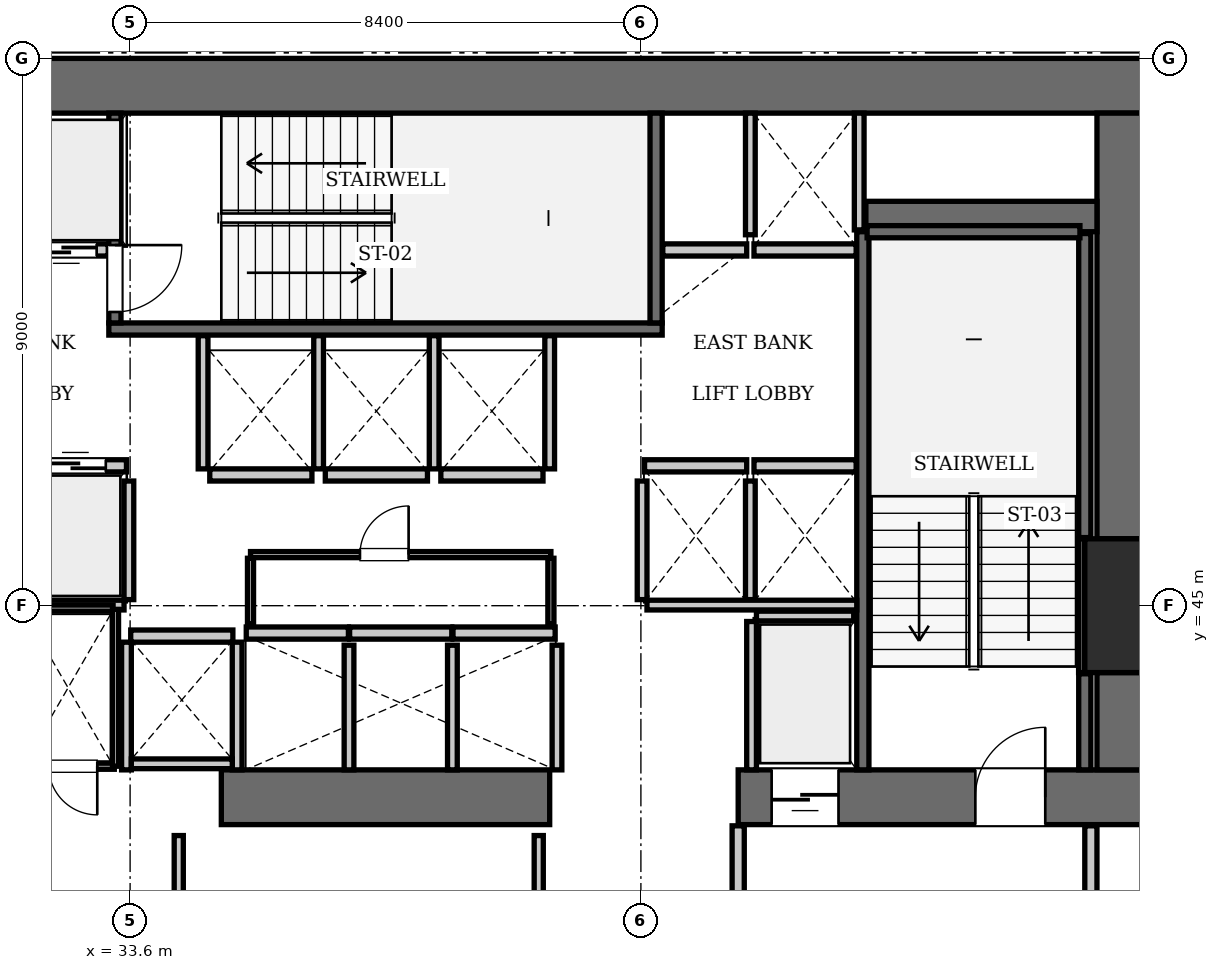
"""IFC4 building model, lengths in metres.
Left out: names, types, materials, properties, quantities, classifications, styles, units other than length and angle.
Written with IfcOpenShell. Run it as: python <this file> out.ifc"""

import sys

from ifc_helpers import new_model, si_unit, direction, frame, frame_2d, origin, origin_2d, place, context, subcontext, project, spatial, rectangle, extrude, element, fill, save


model = new_model("IFC4")
c1 = context("Model", 3, precision=1e-05, world=origin(), true_north=direction((0.0, 1.0)))
c2 = subcontext(c1, "Body", "Model", "MODEL_VIEW")
j1 = project(units=[si_unit("LENGTHUNIT", "METRE"), si_unit("PLANEANGLEUNIT", "RADIAN")], contexts=[c1])
p1 = place(None, origin())
s1 = spatial("IfcSite", under=j1, at=p1, CompositionType="ELEMENT")
p2 = place(p1, origin())
s2 = spatial("IfcBuilding", under=s1, at=p2, CompositionType="ELEMENT")
p3 = place(p2, frame((0.0, 0.0, 53.9)))
s3 = spatial("IfcBuildingStorey", under=s2, at=p3, CompositionType="ELEMENT", Elevation=53.9)
p4 = place(p3, frame((50.4, 45.0, 0.0), z_axis=(0.0, 0.0, 1.0), x_axis=(1.0, 0.0, 0.0)))
e1 = element("IfcColumn", 1, at=p4, inside=s3, PredefinedType="COLUMN", context=c2, shape_type="SweptSolid", body=[
    extrude(rectangle(XDim=2.2, YDim=2.2, at=origin_2d()), origin(), (0.0, 0.0, 1.0), 3.85),
])
p5 = place(p3, frame((25.2, 53.55, 0.0), z_axis=(0.0, 0.0, 1.0), x_axis=(1.0, 0.0, 0.0)))
e2 = element("IfcWall", 2, at=p5, inside=s3, PredefinedType="SHEAR", context=c2, shape_type="SweptSolid", body=[
    extrude(rectangle(XDim=25.2, YDim=0.9, at=frame_2d((12.6, 0.0))), origin(), (0.0, 0.0, 1.0), 3.85),
])
p6 = place(p3, frame((35.1, 41.85, 0.0), z_axis=(0.0, 0.0, 1.0), x_axis=(1.0, 0.0, 0.0)))
e3 = element("IfcWall", 3, at=p6, inside=s3, PredefinedType="SHEAR", context=c2, shape_type="SweptSolid", body=[
    extrude(rectangle(XDim=5.4, YDim=0.9, at=frame_2d((2.7, 0.0))), origin(), (0.0, 0.0, 1.0), 3.85),
])
p7 = place(p3, frame((43.6, 41.85, 0.0), z_axis=(0.0, 0.0, 1.0), x_axis=(1.0, 0.0, 0.0)))
e4 = element("IfcWall", 4, at=p7, inside=s3, PredefinedType="SHEAR", context=c2, shape_type="SweptSolid", body=[
    extrude(rectangle(XDim=6.8, YDim=0.9, at=frame_2d((3.4, 0.0))), origin(), (0.0, 0.0, 1.0), 3.85),
])
p8 = place(p7, frame((3.9, 0.0, 0.0)))
e5 = element("IfcOpeningElement", 5, at=p8, cuts=e4, PredefinedType="OPENING", context=c2, shape_type="SweptSolid", body=[
    extrude(rectangle(XDim=1.15, YDim=2.15, at=frame_2d((0.575, 1.075))), frame((0.0, 0.46, 0.0), z_axis=(0.0, -1.0, 0.0), x_axis=(1.0, 0.0, 0.0)), (0.0, 0.0, 1.0), 0.92),
])
p9 = place(p7, frame((0.55, 0.0, 0.0)))
e6 = element("IfcOpeningElement", 6, at=p9, cuts=e4, PredefinedType="OPENING", context=c2, shape_type="SweptSolid", body=[
    extrude(rectangle(XDim=1.1, YDim=2.2, at=frame_2d((0.55, 1.1))), frame((0.0, 0.46, 0.0), z_axis=(0.0, -1.0, 0.0), x_axis=(1.0, 0.0, 0.0)), (0.0, 0.0, 1.0), 0.92),
])
p10 = place(p3, frame((49.95, 42.3, 0.0), z_axis=(0.0, 0.0, 1.0), x_axis=(0.0, 1.0, 0.0)))
e7 = element("IfcWall", 7, at=p10, inside=s3, PredefinedType="SHEAR", context=c2, shape_type="SweptSolid", body=[
    extrude(rectangle(XDim=1.6, YDim=0.9, at=frame_2d((0.8, 0.0))), origin(), (0.0, 0.0, 1.0), 3.85),
])
p11 = place(p3, frame((49.95, 46.1, 0.0), z_axis=(0.0, 0.0, 1.0), x_axis=(0.0, 1.0, 0.0)))
e8 = element("IfcWall", 8, at=p11, inside=s3, PredefinedType="SHEAR", context=c2, shape_type="SweptSolid", body=[
    extrude(rectangle(XDim=7.0, YDim=0.9, at=frame_2d((3.5, 0.0))), origin(), (0.0, 0.0, 1.0), 3.85),
])
p12 = place(p3, frame((45.7, 51.4, 0.0), z_axis=(0.0, 0.0, 1.0), x_axis=(1.0, 0.0, 0.0)))
e9 = element("IfcWall", 9, at=p12, inside=s3, PredefinedType="SHEAR", context=c2, shape_type="SweptSolid", body=[
    extrude(rectangle(XDim=3.8, YDim=0.5, at=frame_2d((1.9, 0.0))), origin(), (0.0, 0.0, 1.0), 3.85),
])
p13 = place(p3, frame((33.25, 49.55, 0.0), z_axis=(0.0, 0.0, 1.0), x_axis=(1.0, 0.0, 0.0)))
e10 = element("IfcWall", 10, at=p13, inside=s3, PredefinedType="SOLIDWALL", context=c2, shape_type="SweptSolid", body=[
    extrude(rectangle(XDim=9.1, YDim=0.2, at=frame_2d((4.55, 0.0))), origin(), (0.0, 0.0, 1.0), 3.61),
])
p14 = place(p3, frame((42.25, 49.65, 0.0), z_axis=(0.0, 0.0, 1.0), x_axis=(0.0, 1.0, 0.0)))
e11 = element("IfcWall", 11, at=p14, inside=s3, PredefinedType="SOLIDWALL", context=c2, shape_type="SweptSolid", body=[
    extrude(rectangle(XDim=3.45, YDim=0.2, at=frame_2d((1.725, 0.0))), origin(), (0.0, 0.0, 1.0), 3.61),
])
p15 = place(p3, frame((33.35, 49.65, 0.0), z_axis=(0.0, 0.0, 1.0), x_axis=(0.0, 1.0, 0.0)))
e12 = element("IfcWall", 12, at=p15, inside=s3, PredefinedType="SOLIDWALL", context=c2, shape_type="SweptSolid", body=[
    extrude(rectangle(XDim=3.45, YDim=0.2, at=frame_2d((1.725, 0.0))), origin(), (0.0, 0.0, 1.0), 3.61),
])
p16 = place(p15, frame((0.18, 0.0, 0.0)))
e13 = element("IfcOpeningElement", 13, at=p16, cuts=e12, PredefinedType="OPENING", context=c2, shape_type="SweptSolid", body=[
    extrude(rectangle(XDim=1.1, YDim=2.15, at=frame_2d((0.55, 1.075))), frame((0.0, 0.11, 0.0), z_axis=(0.0, -1.0, 0.0), x_axis=(1.0, 0.0, 0.0)), (0.0, 0.0, 1.0), 0.22),
])
p17 = place(p3, frame((45.65, 42.3, 0.0), z_axis=(0.0, 0.0, 1.0), x_axis=(0.0, 1.0, 0.0)))
e14 = element("IfcWall", 14, at=p17, inside=s3, PredefinedType="SOLIDWALL", context=c2, shape_type="SweptSolid", body=[
    extrude(rectangle(XDim=8.85, YDim=0.2, at=frame_2d((4.425, 0.0))), origin(), (0.0, 0.0, 1.0), 3.61),
])
p18 = place(p3, frame((49.3, 42.3, 0.0), z_axis=(0.0, 0.0, 1.0), x_axis=(0.0, 1.0, 0.0)))
e15 = element("IfcWall", 15, at=p18, inside=s3, PredefinedType="SOLIDWALL", context=c2, shape_type="SweptSolid", body=[
    extrude(rectangle(XDim=1.58, YDim=0.2, at=frame_2d((0.79, 0.0))), origin(), (0.0, 0.0, 1.0), 3.61),
])
p19 = place(p3, frame((49.3, 46.12, 0.0), z_axis=(0.0, 0.0, 1.0), x_axis=(0.0, 1.0, 0.0)))
e16 = element("IfcWall", 16, at=p19, inside=s3, PredefinedType="SOLIDWALL", context=c2, shape_type="SweptSolid", body=[
    extrude(rectangle(XDim=5.0, YDim=0.2, at=frame_2d((2.5, 0.0))), origin(), (0.0, 0.0, 1.0), 3.61),
])
p20 = place(p3, frame((45.72, 51.15, 0.0), z_axis=(0.0, 0.0, 1.0), x_axis=(1.0, 0.0, 0.0)))
e17 = element("IfcWall", 17, at=p20, inside=s3, PredefinedType="SOLIDWALL", context=c2, shape_type="SweptSolid", body=[
    extrude(rectangle(XDim=3.5, YDim=0.2, at=frame_2d((1.75, 0.0))), origin(), (0.0, 0.0, 1.0), 3.61),
])
p21 = place(p3, frame((49.248, 43.9, 0.0), z_axis=(0.0, 0.0, 1.0), x_axis=(0.0, 1.0, 0.0)))
e18 = element("IfcWall", 18, at=p21, inside=s3, PredefinedType="SOLIDWALL", context=c2, shape_type="SweptSolid", body=[
    extrude(rectangle(XDim=2.2, YDim=0.1, at=frame_2d((1.1, 0.0))), origin(), (0.0, 0.0, 1.0), 3.61),
])
p22 = place(p3, frame((31.86, 47.3, 0.0), z_axis=(0.0, 0.0, 1.0), x_axis=(1.0, 0.0, 0.0)))
e19 = element("IfcWall", 19, at=p22, inside=s3, PredefinedType="SOLIDWALL", context=c2, shape_type="SweptSolid", body=[
    extrude(rectangle(XDim=1.68, YDim=0.2, at=frame_2d((0.84, 0.0))), origin(), (0.0, 0.0, 1.0), 3.61),
])
p23 = place(p22, frame((0.34, 0.0, 0.0)))
e20 = element("IfcOpeningElement", 20, at=p23, cuts=e19, PredefinedType="OPENING", context=c2, shape_type="SweptSolid", body=[
    extrude(rectangle(XDim=1.0, YDim=2.15, at=frame_2d((0.5, 1.075))), frame((0.0, 0.11, 0.0), z_axis=(0.0, -1.0, 0.0), x_axis=(1.0, 0.0, 0.0)), (0.0, 0.0, 1.0), 0.22),
])
p24 = place(p3, frame((31.86, 50.85, 0.0), z_axis=(0.0, 0.0, 1.0), x_axis=(1.0, 0.0, 0.0)))
e21 = element("IfcWall", 21, at=p24, inside=s3, PredefinedType="SOLIDWALL", context=c2, shape_type="SweptSolid", body=[
    extrude(rectangle(XDim=1.38, YDim=0.2, at=frame_2d((0.69, 0.0))), origin(), (0.0, 0.0, 1.0), 3.61),
])
p25 = place(p24, frame((0.19, 0.0, 0.0)))
e22 = element("IfcOpeningElement", 22, at=p25, cuts=e21, PredefinedType="OPENING", context=c2, shape_type="SweptSolid", body=[
    extrude(rectangle(XDim=1.0, YDim=2.15, at=frame_2d((0.5, 1.075))), frame((0.0, 0.11, 0.0), z_axis=(0.0, -1.0, 0.0), x_axis=(1.0, 0.0, 0.0)), (0.0, 0.0, 1.0), 0.22),
])
for number, where, z_axis, x_axis in (
    (23, (42.06, 47.3, 0.0), (0.0, 0.0, 1.0), (1.0, 0.0, 0.0)),
    (24, (43.86, 47.3, 0.0), (0.0, 0.0, 1.0), (1.0, 0.0, 0.0)),
):
    element("IfcWall", number, at=place(p3, frame(where, z_axis=z_axis, x_axis=x_axis)), inside=s3, PredefinedType="SOLIDWALL", context=c2, shape_type="SweptSolid", body=[
        extrude(rectangle(XDim=1.68, YDim=0.2, at=frame_2d((0.84, 0.0))), origin(), (0.0, 0.0, 1.0), 3.61),
    ])
p26 = place(p3, frame((42.36, 50.85, 0.0), z_axis=(0.0, 0.0, 1.0), x_axis=(1.0, 0.0, 0.0)))
e25 = element("IfcWall", 25, at=p26, inside=s3, PredefinedType="SOLIDWALL", context=c2, shape_type="SweptSolid", body=[
    extrude(rectangle(XDim=1.38, YDim=0.2, at=frame_2d((0.69, 0.0))), origin(), (0.0, 0.0, 1.0), 3.61),
])
for number, where, z_axis, x_axis in (
    (26, (43.86, 50.85, 0.0), (0.0, 0.0, 1.0), (1.0, 0.0, 0.0)),
    (27, (35.51, 44.55, 0.0), (0.0, 0.0, 1.0), (1.0, 0.0, 0.0)),
    (28, (37.21, 44.55, 0.0), (0.0, 0.0, 1.0), (1.0, 0.0, 0.0)),
):
    element("IfcWall", number, at=place(p3, frame(where, z_axis=z_axis, x_axis=x_axis)), inside=s3, PredefinedType="SOLIDWALL", context=c2, shape_type="SweptSolid", body=[
        extrude(rectangle(XDim=1.68, YDim=0.2, at=frame_2d((0.84, 0.0))), origin(), (0.0, 0.0, 1.0), 3.61),
    ])
for number, where, z_axis, x_axis in (
    (29, (38.91, 44.55, 0.0), (0.0, 0.0, 1.0), (1.0, 0.0, 0.0)),
    (30, (34.91, 47.15, 0.0), (0.0, 0.0, 1.0), (1.0, 0.0, 0.0)),
):
    element("IfcWall", number, at=place(p3, frame(where, z_axis=z_axis, x_axis=x_axis)), inside=s3, PredefinedType="SOLIDWALL", context=c2, shape_type="SweptSolid", body=[
        extrude(rectangle(XDim=1.68, YDim=0.2, at=frame_2d((0.84, 0.0))), origin(), (0.0, 0.0, 1.0), 3.61),
    ])
for number, where, z_axis, x_axis in (
    (31, (36.81, 47.15, 0.0), (0.0, 0.0, 1.0), (1.0, 0.0, 0.0)),
    (32, (38.71, 47.15, 0.0), (0.0, 0.0, 1.0), (1.0, 0.0, 0.0)),
    (33, (33.61, 44.5, 0.0), (0.0, 0.0, 1.0), (1.0, 0.0, 0.0)),
):
    element("IfcWall", number, at=place(p3, frame(where, z_axis=z_axis, x_axis=x_axis)), inside=s3, PredefinedType="SOLIDWALL", context=c2, shape_type="SweptSolid", body=[
        extrude(rectangle(XDim=1.68, YDim=0.2, at=frame_2d((0.84, 0.0))), origin(), (0.0, 0.0, 1.0), 3.61),
    ])
p27 = place(p3, frame((43.9, 44.83, 0.0), z_axis=(0.0, 0.0, 1.0), x_axis=(1.0, 0.0, 0.0)))
e34 = element("IfcWall", 34, at=p27, inside=s3, PredefinedType="SOLIDWALL", context=c2, shape_type="SweptSolid", body=[
    extrude(rectangle(XDim=1.6, YDim=0.16, at=frame_2d((0.8, 0.0))), origin(), (0.0, 0.0, 1.0), 3.61),
])
p28 = place(p3, frame((43.82, 42.3, 0.0), z_axis=(0.0, 0.0, 1.0), x_axis=(0.0, 1.0, 0.0)))
e35 = element("IfcWall", 35, at=p28, inside=s3, PredefinedType="SOLIDWALL", context=c2, shape_type="SweptSolid", body=[
    extrude(rectangle(XDim=2.44, YDim=0.16, at=frame_2d((1.22, 0.0))), origin(), (0.0, 0.0, 1.0), 3.61),
])
p29 = place(p3, frame((33.58, 45.1, 0.0), z_axis=(0.0, 0.0, 1.0), x_axis=(0.0, 1.0, 0.0)))
e36 = element("IfcWall", 36, at=p29, inside=s3, PredefinedType="SOLIDWALL", context=c2, shape_type="SweptSolid", body=[
    extrude(rectangle(XDim=1.95, YDim=0.16, at=frame_2d((0.975, 0.0))), origin(), (0.0, 0.0, 1.0), 3.61),
])
p30 = place(p3, frame((30.05, 45.01, 0.0), z_axis=(0.0, 0.0, 1.0), x_axis=(1.0, 0.0, 0.0)))
e37 = element("IfcWall", 37, at=p30, inside=s3, PredefinedType="SOLIDWALL", context=c2, shape_type="SweptSolid", body=[
    extrude(rectangle(XDim=3.45, YDim=0.16, at=frame_2d((1.725, 0.0))), origin(), (0.0, 0.0, 1.0), 3.61),
])
for number, where, z_axis, x_axis in (
    (38, (42.02, 45.1, 0.0), (0.0, 0.0, 1.0), (0.0, 1.0, 0.0)),
    (39, (43.8, 45.1, 0.0), (0.0, 0.0, 1.0), (0.0, 1.0, 0.0)),
):
    element("IfcWall", number, at=place(p3, frame(where, z_axis=z_axis, x_axis=x_axis)), inside=s3, PredefinedType="SOLIDWALL", context=c2, shape_type="SweptSolid", body=[
        extrude(rectangle(XDim=1.95, YDim=0.16, at=frame_2d((0.975, 0.0))), origin(), (0.0, 0.0, 1.0), 3.61),
    ])
p31 = place(p3, frame((42.1, 45.01, 0.0), z_axis=(0.0, 0.0, 1.0), x_axis=(1.0, 0.0, 0.0)))
e40 = element("IfcWall", 40, at=p31, inside=s3, PredefinedType="SOLIDWALL", context=c2, shape_type="SweptSolid", body=[
    extrude(rectangle(XDim=3.45, YDim=0.16, at=frame_2d((1.725, 0.0))), origin(), (0.0, 0.0, 1.0), 3.61),
])
p32 = place(p3, frame((45.59, 51.18, 0.0), z_axis=(0.0, 0.0, 1.0), x_axis=(0.0, 1.0, 0.0)))
e41 = element("IfcWall", 41, at=p32, inside=s3, PredefinedType="SOLIDWALL", context=c2, shape_type="SweptSolid", body=[
    extrude(rectangle(XDim=1.92, YDim=0.16, at=frame_2d((0.96, 0.0))), origin(), (0.0, 0.0, 1.0), 3.61),
])
p33 = place(p3, frame((43.8, 51.1, 0.0), z_axis=(0.0, 0.0, 1.0), x_axis=(0.0, 1.0, 0.0)))
e42 = element("IfcWall", 42, at=p33, inside=s3, PredefinedType="SOLIDWALL", context=c2, shape_type="SweptSolid", body=[
    extrude(rectangle(XDim=2.0, YDim=0.16, at=frame_2d((1.0, 0.0))), origin(), (0.0, 0.0, 1.0), 3.61),
])
for number, where, z_axis, x_axis in (
    (43, (37.2, 42.3, 0.0), (0.0, 0.0, 1.0), (0.0, 1.0, 0.0)),
    (44, (38.9, 42.3, 0.0), (0.0, 0.0, 1.0), (0.0, 1.0, 0.0)),
    (45, (40.62, 42.3, 0.0), (0.0, 0.0, 1.0), (0.0, 1.0, 0.0)),
):
    element("IfcWall", number, at=place(p3, frame(where, z_axis=z_axis, x_axis=x_axis)), inside=s3, PredefinedType="SOLIDWALL", context=c2, shape_type="SweptSolid", body=[
        extrude(rectangle(XDim=2.05, YDim=0.16, at=frame_2d((1.025, 0.0))), origin(), (0.0, 0.0, 1.0), 3.61),
    ])
for number, where, z_axis, x_axis in (
    (46, (34.8, 47.25, 0.0), (0.0, 0.0, 1.0), (0.0, 1.0, 0.0)),
    (47, (36.7, 47.25, 0.0), (0.0, 0.0, 1.0), (0.0, 1.0, 0.0)),
    (48, (38.6, 47.25, 0.0), (0.0, 0.0, 1.0), (0.0, 1.0, 0.0)),
    (49, (40.5, 47.25, 0.0), (0.0, 0.0, 1.0), (0.0, 1.0, 0.0)),
):
    element("IfcWall", number, at=place(p3, frame(where, z_axis=z_axis, x_axis=x_axis)), inside=s3, PredefinedType="SOLIDWALL", context=c2, shape_type="SweptSolid", body=[
        extrude(rectangle(XDim=2.19, YDim=0.16, at=frame_2d((1.095, 0.0))), origin(), (0.0, 0.0, 1.0), 3.61),
    ])
for number, where, z_axis, x_axis in (
    (50, (33.54, 42.3, 0.0), (0.0, 0.0, 1.0), (0.0, 1.0, 0.0)),
    (51, (35.36, 42.3, 0.0), (0.0, 0.0, 1.0), (0.0, 1.0, 0.0)),
):
    element("IfcWall", number, at=place(p3, frame(where, z_axis=z_axis, x_axis=x_axis)), inside=s3, PredefinedType="SOLIDWALL", context=c2, shape_type="SweptSolid", body=[
        extrude(rectangle(XDim=2.1, YDim=0.16, at=frame_2d((1.05, 0.0))), origin(), (0.0, 0.0, 1.0), 3.61),
    ])
p34 = place(p3, frame((33.62, 42.4, 0.0), z_axis=(0.0, 0.0, 1.0), x_axis=(1.0, 0.0, 0.0)))
e52 = element("IfcWall", 52, at=p34, inside=s3, PredefinedType="SOLIDWALL", context=c2, shape_type="SweptSolid", body=[
    extrude(rectangle(XDim=1.66, YDim=0.16, at=frame_2d((0.83, 0.0))), origin(), (0.0, 0.0, 1.0), 3.61),
])
for number, where, z_axis, x_axis in (
    (53, (43.6, 38.31, 0.0), (0.0, 0.0, 1.0), (0.0, 1.0, 0.0)),
    (54, (49.4, 38.31, 0.0), (0.0, 0.0, 1.0), (0.0, 1.0, 0.0)),
):
    element("IfcWall", number, at=place(p3, frame(where, z_axis=z_axis, x_axis=x_axis)), inside=s3, PredefinedType="PARTITIONING", context=c2, shape_type="SweptSolid", body=[
        extrude(rectangle(XDim=3.07, YDim=0.2, at=frame_2d((1.535, 0.0))), origin(), (0.0, 0.0, 1.0), 3.61),
    ])
p35 = place(p3, frame((32.02, 42.36, 0.0), z_axis=(0.0, 0.0, 1.0), x_axis=(1.0, 0.0, 0.0)))
e55 = element("IfcWall", 55, at=p35, inside=s3, PredefinedType="PARTITIONING", context=c2, shape_type="SweptSolid", body=[
    extrude(rectangle(XDim=1.32, YDim=0.1, at=frame_2d((0.66, 0.0))), origin(), (0.0, 0.0, 1.0), 3.61),
])
p36 = place(p35, frame((0.24, 0.0, 0.0)))
e56 = element("IfcOpeningElement", 56, at=p36, cuts=e55, PredefinedType="OPENING", context=c2, shape_type="SweptSolid", body=[
    extrude(rectangle(XDim=0.8, YDim=2.05, at=frame_2d((0.4, 1.025))), frame((0.0, 0.06, 0.0), z_axis=(0.0, -1.0, 0.0), x_axis=(1.0, 0.0, 0.0)), (0.0, 0.0, 1.0), 0.12),
])
p37 = place(p3, frame((31.84, 44.96, 0.0), z_axis=(0.0, 0.0, 1.0), x_axis=(1.0, 0.0, 0.0)))
e57 = element("IfcWall", 57, at=p37, inside=s3, PredefinedType="PARTITIONING", context=c2, shape_type="SweptSolid", body=[
    extrude(rectangle(XDim=1.48, YDim=0.1, at=frame_2d((0.74, 0.0))), origin(), (0.0, 0.0, 1.0), 3.61),
])
p38 = place(p3, frame((33.36, 42.36, 0.0), z_axis=(0.0, 0.0, 1.0), x_axis=(0.0, 1.0, 0.0)))
e58 = element("IfcWall", 58, at=p38, inside=s3, PredefinedType="PARTITIONING", context=c2, shape_type="SweptSolid", body=[
    extrude(rectangle(XDim=2.58, YDim=0.1, at=frame_2d((1.29, 0.0))), origin(), (0.0, 0.0, 1.0), 3.61),
])
p39 = place(p3, frame((35.58, 45.84, 0.0), z_axis=(0.0, 0.0, 1.0), x_axis=(1.0, 0.0, 0.0)))
e59 = element("IfcWall", 59, at=p39, inside=s3, PredefinedType="PARTITIONING", context=c2, shape_type="SweptSolid", body=[
    extrude(rectangle(XDim=4.94, YDim=0.1, at=frame_2d((2.47, 0.0))), origin(), (0.0, 0.0, 1.0), 3.61),
])
p40 = place(p39, frame((1.8, 0.0, 0.0)))
e60 = element("IfcOpeningElement", 60, at=p40, cuts=e59, PredefinedType="OPENING", context=c2, shape_type="SweptSolid", body=[
    extrude(rectangle(XDim=0.8, YDim=2.05, at=frame_2d((0.4, 1.025))), frame((0.0, 0.06, 0.0), z_axis=(0.0, -1.0, 0.0), x_axis=(1.0, 0.0, 0.0)), (0.0, 0.0, 1.0), 0.12),
])
for number, where, z_axis, x_axis in (
    (61, (35.58, 44.7, 0.0), (0.0, 0.0, 1.0), (0.0, 1.0, 0.0)),
    (62, (40.52, 44.7, 0.0), (0.0, 0.0, 1.0), (0.0, 1.0, 0.0)),
):
    element("IfcWall", number, at=place(p3, frame(where, z_axis=z_axis, x_axis=x_axis)), inside=s3, PredefinedType="PARTITIONING", context=c2, shape_type="SweptSolid", body=[
        extrude(rectangle(XDim=1.08, YDim=0.1, at=frame_2d((0.54, 0.0))), origin(), (0.0, 0.0, 1.0), 3.61),
    ])
for number, where, z_axis, x_axis in (
    (63, (34.4, 38.38, 0.0), (0.0, 0.0, 1.0), (0.0, 1.0, 0.0)),
    (64, (40.32, 38.38, 0.0), (0.0, 0.0, 1.0), (0.0, 1.0, 0.0)),
):
    element("IfcWall", number, at=place(p3, frame(where, z_axis=z_axis, x_axis=x_axis)), inside=s3, PredefinedType="PARTITIONING", context=c2, shape_type="SweptSolid", body=[
        extrude(rectangle(XDim=2.84, YDim=0.15, at=frame_2d((1.42, 0.0))), origin(), (0.0, 0.0, 1.0), 3.61),
    ])
p41 = place(p16, frame((1.1, 0.0, 0.0), z_axis=(0.0, 0.0, 1.0), x_axis=(-1.0, 0.0, 0.0)))
e65 = element("IfcDoor", 65, at=p41, inside=s3, OperationType="SINGLE_SWING_LEFT", PredefinedType="DOOR", context=c2, shape_type="SweptSolid", body=[
    extrude(rectangle(XDim=1.1, YDim=2.15, at=frame_2d((0.55, 1.075))), frame((0.0, 0.025, 0.0), z_axis=(0.0, -1.0, 0.0), x_axis=(1.0, 0.0, 0.0)), (0.0, 0.0, 1.0), 0.05),
])
fill(e13, e65)
p42 = place(p8, origin())
e66 = element("IfcDoor", 66, at=p42, inside=s3, OperationType="SINGLE_SWING_RIGHT", PredefinedType="DOOR", context=c2, shape_type="SweptSolid", body=[
    extrude(rectangle(XDim=1.15, YDim=2.15, at=frame_2d((0.575, 1.075))), frame((0.0, 0.025, 0.0), z_axis=(0.0, -1.0, 0.0), x_axis=(1.0, 0.0, 0.0)), (0.0, 0.0, 1.0), 0.05),
])
fill(e5, e66)
p43 = place(p23, origin())
e67 = element("IfcDoor", 67, at=p43, inside=s3, OperationType="SLIDING_TO_LEFT", PredefinedType="DOOR", context=c2, shape_type="SweptSolid", body=[
    extrude(rectangle(XDim=1.0, YDim=2.15, at=frame_2d((0.5, 1.075))), frame((0.0, 0.025, 0.0), z_axis=(0.0, -1.0, 0.0), x_axis=(1.0, 0.0, 0.0)), (0.0, 0.0, 1.0), 0.05),
])
fill(e20, e67)
p44 = place(p25, frame((1.0, 0.0, 0.0), z_axis=(0.0, 0.0, 1.0), x_axis=(-1.0, 0.0, 0.0)))
e68 = element("IfcDoor", 68, at=p44, inside=s3, OperationType="SLIDING_TO_LEFT", PredefinedType="DOOR", context=c2, shape_type="SweptSolid", body=[
    extrude(rectangle(XDim=1.0, YDim=2.15, at=frame_2d((0.5, 1.075))), frame((0.0, 0.025, 0.0), z_axis=(0.0, -1.0, 0.0), x_axis=(1.0, 0.0, 0.0)), (0.0, 0.0, 1.0), 0.05),
])
fill(e22, e68)
p45 = place(p9, frame((1.1, 0.0, 0.0), z_axis=(0.0, 0.0, 1.0), x_axis=(-1.0, 0.0, 0.0)))
e69 = element("IfcDoor", 69, at=p45, inside=s3, OperationType="SLIDING_TO_LEFT", PredefinedType="DOOR", context=c2, shape_type="SweptSolid", body=[
    extrude(rectangle(XDim=1.1, YDim=2.2, at=frame_2d((0.55, 1.1))), frame((0.0, 0.025, 0.0), z_axis=(0.0, -1.0, 0.0), x_axis=(1.0, 0.0, 0.0)), (0.0, 0.0, 1.0), 0.05),
])
fill(e6, e69)
p46 = place(p36, frame((0.8, 0.0, 0.0), z_axis=(0.0, 0.0, 1.0), x_axis=(-1.0, 0.0, 0.0)))
e70 = element("IfcDoor", 70, at=p46, inside=s3, OperationType="SINGLE_SWING_LEFT", PredefinedType="DOOR", context=c2, shape_type="SweptSolid", body=[
    extrude(rectangle(XDim=0.8, YDim=2.05, at=frame_2d((0.4, 1.025))), frame((0.0, 0.025, 0.0), z_axis=(0.0, -1.0, 0.0), x_axis=(1.0, 0.0, 0.0)), (0.0, 0.0, 1.0), 0.05),
])
fill(e56, e70)
p47 = place(p40, origin())
e71 = element("IfcDoor", 71, at=p47, inside=s3, OperationType="SINGLE_SWING_RIGHT", PredefinedType="DOOR", context=c2, shape_type="SweptSolid", body=[
    extrude(rectangle(XDim=0.8, YDim=2.05, at=frame_2d((0.4, 1.025))), frame((0.0, 0.025, 0.0), z_axis=(0.0, -1.0, 0.0), x_axis=(1.0, 0.0, 0.0)), (0.0, 0.0, 1.0), 0.05),
])
fill(e60, e71)
save(model, sys.argv[1])
